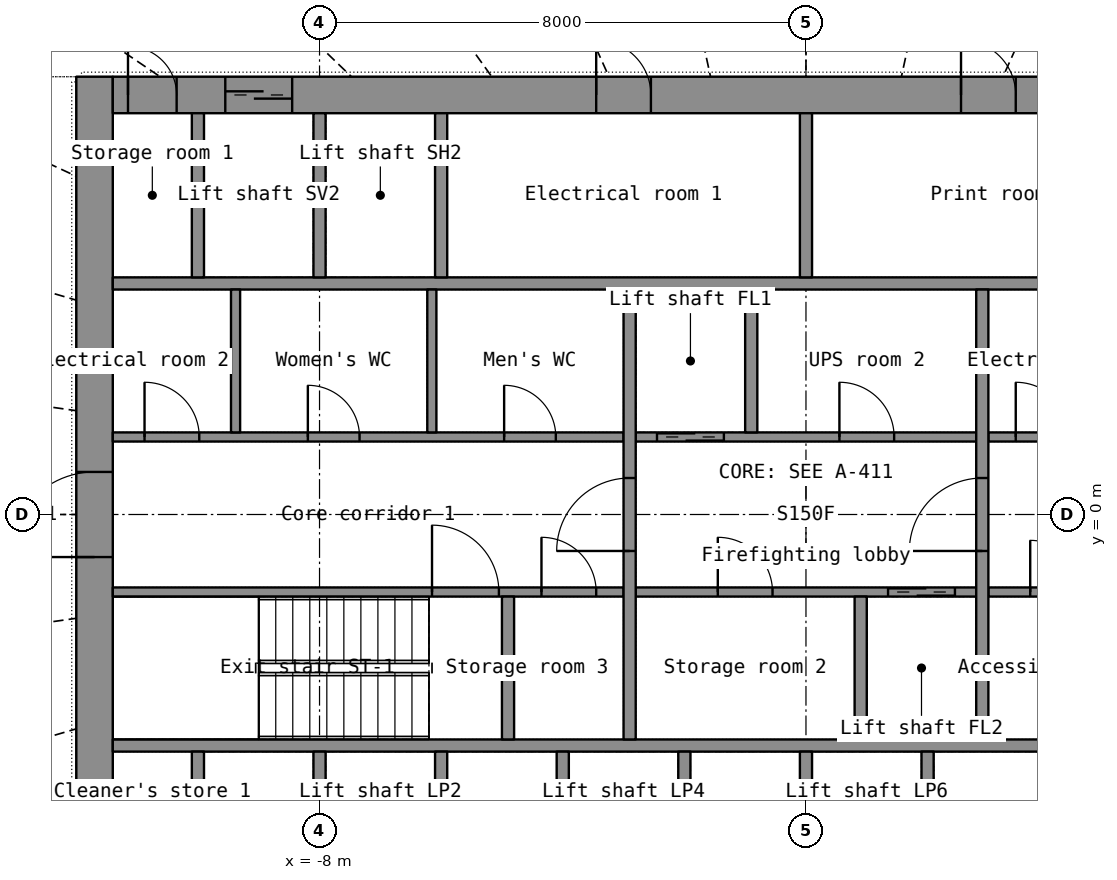
"""IFC4 building model, lengths in metres.
Left out: names, types, materials, properties, quantities, classifications, styles, units other than length and angle.
Written with IfcOpenShell. Run it as: python <this file> out.ifc"""

import sys

from ifc_helpers import new_model, si_unit, direction, frame, frame_2d, origin, place, context, subcontext, project, spatial, rectangle, extrude, element, fill, save


model = new_model("IFC4")
c1 = context("Model", 3, precision=1e-05, world=origin(), true_north=direction((0.0, 1.0)))
c2 = subcontext(c1, "Body", "Model", "MODEL_VIEW")
j1 = project(units=[si_unit("LENGTHUNIT", "METRE"), si_unit("PLANEANGLEUNIT", "RADIAN")], contexts=[c1])
p1 = place(None, origin())
s1 = spatial("IfcSite", under=j1, at=p1, CompositionType="ELEMENT")
p2 = place(p1, origin())
s2 = spatial("IfcBuilding", under=s1, at=p2, CompositionType="ELEMENT")
p3 = place(p2, frame((0.0, 0.0, 77.8)))
s3 = spatial("IfcBuildingStorey", under=s2, at=p3, CompositionType="ELEMENT", Elevation=77.8)
p4 = place(p3, frame((-11.7, -7.2, 0.0), z_axis=(0.0, 0.0, 1.0), x_axis=(0.0, 1.0, 0.0)))
e1 = element("IfcWall", 1, at=p4, inside=s3, PredefinedType="SHEAR", context=c2, shape_type="SweptSolid", body=[
    extrude(rectangle(XDim=14.4, YDim=0.6, at=frame_2d((7.2, 0.0))), origin(), (0.0, 0.0, 1.0), 3.3),
])
p5 = place(p4, frame((6.5, 0.0, 0.0)))
e2 = element("IfcOpeningElement", 2, at=p5, cuts=e1, PredefinedType="OPENING", context=c2, shape_type="SweptSolid", body=[
    extrude(rectangle(XDim=1.4, YDim=2.2, at=frame_2d((0.7, 1.1))), frame((0.0, 0.31, 0.0), z_axis=(0.0, -1.0, 0.0), x_axis=(1.0, 0.0, 0.0)), (0.0, 0.0, 1.0), 0.62),
])
p6 = place(p3, frame((-11.4, 6.9, 0.0), z_axis=(0.0, 0.0, 1.0), x_axis=(1.0, 0.0, 0.0)))
e3 = element("IfcWall", 3, at=p6, inside=s3, PredefinedType="SHEAR", context=c2, shape_type="SweptSolid", body=[
    extrude(rectangle(XDim=22.8, YDim=0.6, at=frame_2d((11.4, 0.0))), origin(), (0.0, 0.0, 1.0), 3.3),
])
p7 = place(p6, frame((1.85, 0.0, 0.0)))
e4 = element("IfcOpeningElement", 4, at=p7, cuts=e3, PredefinedType="OPENING", context=c2, shape_type="SweptSolid", body=[
    extrude(rectangle(XDim=1.1, YDim=2.2, at=frame_2d((0.55, 1.1))), frame((0.0, 0.31, 0.0), z_axis=(0.0, -1.0, 0.0), x_axis=(1.0, 0.0, 0.0)), (0.0, 0.0, 1.0), 0.62),
])
p8 = place(p6, frame((7.95, 0.0, 0.0)))
e5 = element("IfcOpeningElement", 5, at=p8, cuts=e3, PredefinedType="OPENING", context=c2, shape_type="SweptSolid", body=[
    extrude(rectangle(XDim=0.9, YDim=2.1, at=frame_2d((0.45, 1.05))), frame((0.0, 0.31, 0.0), z_axis=(0.0, -1.0, 0.0), x_axis=(1.0, 0.0, 0.0)), (0.0, 0.0, 1.0), 0.62),
])
p9 = place(p6, frame((13.95, 0.0, 0.0)))
e6 = element("IfcOpeningElement", 6, at=p9, cuts=e3, PredefinedType="OPENING", context=c2, shape_type="SweptSolid", body=[
    extrude(rectangle(XDim=0.9, YDim=2.1, at=frame_2d((0.45, 1.05))), frame((0.0, 0.31, 0.0), z_axis=(0.0, -1.0, 0.0), x_axis=(1.0, 0.0, 0.0)), (0.0, 0.0, 1.0), 0.62),
])
p10 = place(p6, frame((18.95, 0.0, 0.0)))
e7 = element("IfcOpeningElement", 7, at=p10, cuts=e3, PredefinedType="OPENING", context=c2, shape_type="SweptSolid", body=[
    extrude(rectangle(XDim=0.9, YDim=2.1, at=frame_2d((0.45, 1.05))), frame((0.0, 0.31, 0.0), z_axis=(0.0, -1.0, 0.0), x_axis=(1.0, 0.0, 0.0)), (0.0, 0.0, 1.0), 0.62),
])
p11 = place(p6, frame((0.25, 0.0, 0.0)))
e8 = element("IfcOpeningElement", 8, at=p11, cuts=e3, PredefinedType="OPENING", context=c2, shape_type="SweptSolid", body=[
    extrude(rectangle(XDim=0.8, YDim=2.05, at=frame_2d((0.4, 1.025))), frame((0.0, 0.31, 0.0), z_axis=(0.0, -1.0, 0.0), x_axis=(1.0, 0.0, 0.0)), (0.0, 0.0, 1.0), 0.62),
])
p12 = place(p6, frame((21.75, 0.0, 0.0)))
e9 = element("IfcOpeningElement", 9, at=p12, cuts=e3, PredefinedType="OPENING", context=c2, shape_type="SweptSolid", body=[
    extrude(rectangle(XDim=0.8, YDim=2.05, at=frame_2d((0.4, 1.025))), frame((0.0, 0.31, 0.0), z_axis=(0.0, -1.0, 0.0), x_axis=(1.0, 0.0, 0.0)), (0.0, 0.0, 1.0), 0.62),
])
for number, where, z_axis, x_axis in (
    (10, (-11.4, -3.8, 0.0), (0.0, 0.0, 1.0), (1.0, 0.0, 0.0)),
    (11, (-11.4, 3.8, 0.0), (0.0, 0.0, 1.0), (1.0, 0.0, 0.0)),
):
    element("IfcWall", number, at=place(p3, frame(where, z_axis=z_axis, x_axis=x_axis)), inside=s3, PredefinedType="SHEAR", context=c2, shape_type="SweptSolid", body=[
        extrude(rectangle(XDim=22.8, YDim=0.2, at=frame_2d((11.4, 0.0))), origin(), (0.0, 0.0, 1.0), 3.3),
    ])
for number, where, z_axis, x_axis in (
    (12, (-10.0, -6.6, 0.0), (0.0, 0.0, 1.0), (0.0, 1.0, 0.0)),
    (13, (-8.0, -6.6, 0.0), (0.0, 0.0, 1.0), (0.0, 1.0, 0.0)),
    (14, (-6.0, -6.6, 0.0), (0.0, 0.0, 1.0), (0.0, 1.0, 0.0)),
    (15, (-4.0, -6.6, 0.0), (0.0, 0.0, 1.0), (0.0, 1.0, 0.0)),
    (16, (-2.0, -6.6, 0.0), (0.0, 0.0, 1.0), (0.0, 1.0, 0.0)),
    (17, (0.0, -6.6, 0.0), (0.0, 0.0, 1.0), (0.0, 1.0, 0.0)),
    (18, (2.0, -6.6, 0.0), (0.0, 0.0, 1.0), (0.0, 1.0, 0.0)),
    (19, (-10.0, 3.9, 0.0), (0.0, 0.0, 1.0), (0.0, 1.0, 0.0)),
    (20, (-8.0, 3.9, 0.0), (0.0, 0.0, 1.0), (0.0, 1.0, 0.0)),
    (21, (-6.0, 3.9, 0.0), (0.0, 0.0, 1.0), (0.0, 1.0, 0.0)),
):
    element("IfcWall", number, at=place(p3, frame(where, z_axis=z_axis, x_axis=x_axis)), inside=s3, PredefinedType="SHEAR", context=c2, shape_type="SweptSolid", body=[
        extrude(rectangle(XDim=2.7, YDim=0.2, at=frame_2d((1.35, 0.0))), origin(), (0.0, 0.0, 1.0), 3.3),
    ])
p13 = place(p3, frame((0.0, 3.9, 0.0), z_axis=(0.0, 0.0, 1.0), x_axis=(0.0, 1.0, 0.0)))
e22 = element("IfcWall", 22, at=p13, inside=s3, PredefinedType="PARTITIONING", context=c2, shape_type="SweptSolid", body=[
    extrude(rectangle(XDim=2.7, YDim=0.2, at=frame_2d((1.35, 0.0))), origin(), (0.0, 0.0, 1.0), 3.3),
])
p14 = place(p3, frame((-11.4, -1.275, 0.0), z_axis=(0.0, 0.0, 1.0), x_axis=(1.0, 0.0, 0.0)))
e23 = element("IfcWall", 23, at=p14, inside=s3, PredefinedType="SHEAR", context=c2, shape_type="SweptSolid", body=[
    extrude(rectangle(XDim=8.4, YDim=0.15, at=frame_2d((4.2, 0.0))), origin(), (0.0, 0.0, 1.0), 3.3),
])
p15 = place(p14, frame((5.25, 0.0, 0.0)))
e24 = element("IfcOpeningElement", 24, at=p15, cuts=e23, PredefinedType="OPENING", context=c2, shape_type="SweptSolid", body=[
    extrude(rectangle(XDim=1.1, YDim=2.15, at=frame_2d((0.55, 1.075))), frame((0.0, 0.085, 0.0), z_axis=(0.0, -1.0, 0.0), x_axis=(1.0, 0.0, 0.0)), (0.0, 0.0, 1.0), 0.17),
])
p16 = place(p14, frame((7.05, 0.0, 0.0)))
e25 = element("IfcOpeningElement", 25, at=p16, cuts=e23, PredefinedType="OPENING", context=c2, shape_type="SweptSolid", body=[
    extrude(rectangle(XDim=0.9, YDim=2.1, at=frame_2d((0.45, 1.05))), frame((0.0, 0.085, 0.0), z_axis=(0.0, -1.0, 0.0), x_axis=(1.0, 0.0, 0.0)), (0.0, 0.0, 1.0), 0.17),
])
p17 = place(p3, frame((-2.8, -1.275, 0.0), z_axis=(0.0, 0.0, 1.0), x_axis=(1.0, 0.0, 0.0)))
e26 = element("IfcWall", 26, at=p17, inside=s3, PredefinedType="SHEAR", context=c2, shape_type="SweptSolid", body=[
    extrude(rectangle(XDim=5.6, YDim=0.15, at=frame_2d((2.8, 0.0))), origin(), (0.0, 0.0, 1.0), 3.3),
])
p18 = place(p17, frame((4.15, 0.0, 0.0)))
e27 = element("IfcOpeningElement", 27, at=p18, cuts=e26, PredefinedType="OPENING", context=c2, shape_type="SweptSolid", body=[
    extrude(rectangle(XDim=1.1, YDim=2.2, at=frame_2d((0.55, 1.1))), frame((0.0, 0.085, 0.0), z_axis=(0.0, -1.0, 0.0), x_axis=(1.0, 0.0, 0.0)), (0.0, 0.0, 1.0), 0.17),
])
p19 = place(p17, frame((1.35, 0.0, 0.0)))
e28 = element("IfcOpeningElement", 28, at=p19, cuts=e26, PredefinedType="OPENING", context=c2, shape_type="SweptSolid", body=[
    extrude(rectangle(XDim=0.9, YDim=2.1, at=frame_2d((0.45, 1.05))), frame((0.0, 0.085, 0.0), z_axis=(0.0, -1.0, 0.0), x_axis=(1.0, 0.0, 0.0)), (0.0, 0.0, 1.0), 0.17),
])
p20 = place(p3, frame((3.0, -1.275, 0.0), z_axis=(0.0, 0.0, 1.0), x_axis=(1.0, 0.0, 0.0)))
e29 = element("IfcWall", 29, at=p20, inside=s3, PredefinedType="PARTITIONING", context=c2, shape_type="SweptSolid", body=[
    extrude(rectangle(XDim=8.4, YDim=0.15, at=frame_2d((4.2, 0.0))), origin(), (0.0, 0.0, 1.0), 3.3),
])
p21 = place(p20, frame((0.688, 0.0, 0.0)))
e30 = element("IfcOpeningElement", 30, at=p21, cuts=e29, PredefinedType="OPENING", context=c2, shape_type="SweptSolid", body=[
    extrude(rectangle(XDim=0.85, YDim=2.1, at=frame_2d((0.425, 1.05))), frame((0.0, 0.085, 0.0), z_axis=(0.0, -1.0, 0.0), x_axis=(1.0, 0.0, 0.0)), (0.0, 0.0, 1.0), 0.17),
])
p22 = place(p20, frame((3.144, 0.0, 0.0)))
e31 = element("IfcOpeningElement", 31, at=p22, cuts=e29, PredefinedType="OPENING", context=c2, shape_type="SweptSolid", body=[
    extrude(rectangle(XDim=0.85, YDim=2.1, at=frame_2d((0.425, 1.05))), frame((0.0, 0.085, 0.0), z_axis=(0.0, -1.0, 0.0), x_axis=(1.0, 0.0, 0.0)), (0.0, 0.0, 1.0), 0.17),
])
p23 = place(p20, frame((5.256, 0.0, 0.0)))
e32 = element("IfcOpeningElement", 32, at=p23, cuts=e29, PredefinedType="OPENING", context=c2, shape_type="SweptSolid", body=[
    extrude(rectangle(XDim=0.9, YDim=2.1, at=frame_2d((0.45, 1.05))), frame((0.0, 0.085, 0.0), z_axis=(0.0, -1.0, 0.0), x_axis=(1.0, 0.0, 0.0)), (0.0, 0.0, 1.0), 0.17),
])
p24 = place(p20, frame((7.075, 0.0, 0.0)))
e33 = element("IfcOpeningElement", 33, at=p24, cuts=e29, PredefinedType="OPENING", context=c2, shape_type="SweptSolid", body=[
    extrude(rectangle(XDim=0.9, YDim=2.1, at=frame_2d((0.45, 1.05))), frame((0.0, 0.085, 0.0), z_axis=(0.0, -1.0, 0.0), x_axis=(1.0, 0.0, 0.0)), (0.0, 0.0, 1.0), 0.17),
])
p25 = place(p3, frame((-11.4, 1.275, 0.0), z_axis=(0.0, 0.0, 1.0), x_axis=(1.0, 0.0, 0.0)))
e34 = element("IfcWall", 34, at=p25, inside=s3, PredefinedType="PARTITIONING", context=c2, shape_type="SweptSolid", body=[
    extrude(rectangle(XDim=8.4, YDim=0.15, at=frame_2d((4.2, 0.0))), origin(), (0.0, 0.0, 1.0), 3.3),
])
p26 = place(p25, frame((0.522, 0.0, 0.0)))
e35 = element("IfcOpeningElement", 35, at=p26, cuts=e34, PredefinedType="OPENING", context=c2, shape_type="SweptSolid", body=[
    extrude(rectangle(XDim=0.9, YDim=2.1, at=frame_2d((0.45, 1.05))), frame((0.0, 0.085, 0.0), z_axis=(0.0, -1.0, 0.0), x_axis=(1.0, 0.0, 0.0)), (0.0, 0.0, 1.0), 0.17),
])
p27 = place(p25, frame((3.208, 0.0, 0.0)))
e36 = element("IfcOpeningElement", 36, at=p27, cuts=e34, PredefinedType="OPENING", context=c2, shape_type="SweptSolid", body=[
    extrude(rectangle(XDim=0.85, YDim=2.1, at=frame_2d((0.425, 1.05))), frame((0.0, 0.085, 0.0), z_axis=(0.0, -1.0, 0.0), x_axis=(1.0, 0.0, 0.0)), (0.0, 0.0, 1.0), 0.17),
])
p28 = place(p25, frame((6.436, 0.0, 0.0)))
e37 = element("IfcOpeningElement", 37, at=p28, cuts=e34, PredefinedType="OPENING", context=c2, shape_type="SweptSolid", body=[
    extrude(rectangle(XDim=0.85, YDim=2.1, at=frame_2d((0.425, 1.05))), frame((0.0, 0.085, 0.0), z_axis=(0.0, -1.0, 0.0), x_axis=(1.0, 0.0, 0.0)), (0.0, 0.0, 1.0), 0.17),
])
p29 = place(p3, frame((-2.8, 1.275, 0.0), z_axis=(0.0, 0.0, 1.0), x_axis=(1.0, 0.0, 0.0)))
e38 = element("IfcWall", 38, at=p29, inside=s3, PredefinedType="SHEAR", context=c2, shape_type="SweptSolid", body=[
    extrude(rectangle(XDim=5.6, YDim=0.15, at=frame_2d((2.8, 0.0))), origin(), (0.0, 0.0, 1.0), 3.3),
])
p30 = place(p29, frame((0.35, 0.0, 0.0)))
e39 = element("IfcOpeningElement", 39, at=p30, cuts=e38, PredefinedType="OPENING", context=c2, shape_type="SweptSolid", body=[
    extrude(rectangle(XDim=1.1, YDim=2.2, at=frame_2d((0.55, 1.1))), frame((0.0, 0.085, 0.0), z_axis=(0.0, -1.0, 0.0), x_axis=(1.0, 0.0, 0.0)), (0.0, 0.0, 1.0), 0.17),
])
p31 = place(p29, frame((3.35, 0.0, 0.0)))
e40 = element("IfcOpeningElement", 40, at=p31, cuts=e38, PredefinedType="OPENING", context=c2, shape_type="SweptSolid", body=[
    extrude(rectangle(XDim=0.9, YDim=2.1, at=frame_2d((0.45, 1.05))), frame((0.0, 0.085, 0.0), z_axis=(0.0, -1.0, 0.0), x_axis=(1.0, 0.0, 0.0)), (0.0, 0.0, 1.0), 0.17),
])
p32 = place(p3, frame((3.0, 1.275, 0.0), z_axis=(0.0, 0.0, 1.0), x_axis=(1.0, 0.0, 0.0)))
e41 = element("IfcWall", 41, at=p32, inside=s3, PredefinedType="SHEAR", context=c2, shape_type="SweptSolid", body=[
    extrude(rectangle(XDim=8.4, YDim=0.15, at=frame_2d((4.2, 0.0))), origin(), (0.0, 0.0, 1.0), 3.3),
])
p33 = place(p32, frame((2.05, 0.0, 0.0)))
e42 = element("IfcOpeningElement", 42, at=p33, cuts=e41, PredefinedType="OPENING", context=c2, shape_type="SweptSolid", body=[
    extrude(rectangle(XDim=1.1, YDim=2.15, at=frame_2d((0.55, 1.075))), frame((0.0, 0.085, 0.0), z_axis=(0.0, -1.0, 0.0), x_axis=(1.0, 0.0, 0.0)), (0.0, 0.0, 1.0), 0.17),
])
p34 = place(p32, frame((0.45, 0.0, 0.0)))
e43 = element("IfcOpeningElement", 43, at=p34, cuts=e41, PredefinedType="OPENING", context=c2, shape_type="SweptSolid", body=[
    extrude(rectangle(XDim=0.9, YDim=2.1, at=frame_2d((0.45, 1.05))), frame((0.0, 0.085, 0.0), z_axis=(0.0, -1.0, 0.0), x_axis=(1.0, 0.0, 0.0)), (0.0, 0.0, 1.0), 0.17),
])
p35 = place(p3, frame((-2.9, -3.7, 0.0), z_axis=(0.0, 0.0, 1.0), x_axis=(0.0, 1.0, 0.0)))
e44 = element("IfcWall", 44, at=p35, inside=s3, PredefinedType="SHEAR", context=c2, shape_type="SweptSolid", body=[
    extrude(rectangle(XDim=7.4, YDim=0.2, at=frame_2d((3.7, 0.0))), origin(), (0.0, 0.0, 1.0), 3.3),
])
p36 = place(p35, frame((3.1, 0.0, 0.0)))
e45 = element("IfcOpeningElement", 45, at=p36, cuts=e44, PredefinedType="OPENING", context=c2, shape_type="SweptSolid", body=[
    extrude(rectangle(XDim=1.2, YDim=2.2, at=frame_2d((0.6, 1.1))), frame((0.0, 0.11, 0.0), z_axis=(0.0, -1.0, 0.0), x_axis=(1.0, 0.0, 0.0)), (0.0, 0.0, 1.0), 0.22),
])
p37 = place(p3, frame((2.9, -3.7, 0.0), z_axis=(0.0, 0.0, 1.0), x_axis=(0.0, 1.0, 0.0)))
e46 = element("IfcWall", 46, at=p37, inside=s3, PredefinedType="SHEAR", context=c2, shape_type="SweptSolid", body=[
    extrude(rectangle(XDim=7.4, YDim=0.2, at=frame_2d((3.7, 0.0))), origin(), (0.0, 0.0, 1.0), 3.3),
])
p38 = place(p37, frame((3.1, 0.0, 0.0)))
e47 = element("IfcOpeningElement", 47, at=p38, cuts=e46, PredefinedType="OPENING", context=c2, shape_type="SweptSolid", body=[
    extrude(rectangle(XDim=1.2, YDim=2.2, at=frame_2d((0.6, 1.1))), frame((0.0, 0.11, 0.0), z_axis=(0.0, -1.0, 0.0), x_axis=(1.0, 0.0, 0.0)), (0.0, 0.0, 1.0), 0.22),
])
for number, where, z_axis, x_axis in (
    (48, (-0.9, 1.35, 0.0), (0.0, 0.0, 1.0), (0.0, 1.0, 0.0)),
    (49, (0.9, -3.7, 0.0), (0.0, 0.0, 1.0), (0.0, 1.0, 0.0)),
    (50, (-4.9, -3.7, 0.0), (0.0, 0.0, 1.0), (0.0, 1.0, 0.0)),
):
    element("IfcWall", number, at=place(p3, frame(where, z_axis=z_axis, x_axis=x_axis)), inside=s3, PredefinedType="SHEAR", context=c2, shape_type="SweptSolid", body=[
        extrude(rectangle(XDim=2.35, YDim=0.2, at=frame_2d((1.175, 0.0))), origin(), (0.0, 0.0, 1.0), 3.3),
    ])
for number, where, z_axis, x_axis in (
    (51, (-9.381, 1.35, 0.0), (0.0, 0.0, 1.0), (0.0, 1.0, 0.0)),
    (52, (-6.153, 1.35, 0.0), (0.0, 0.0, 1.0), (0.0, 1.0, 0.0)),
):
    element("IfcWall", number, at=place(p3, frame(where, z_axis=z_axis, x_axis=x_axis)), inside=s3, PredefinedType="PARTITIONING", context=c2, shape_type="SweptSolid", body=[
        extrude(rectangle(XDim=2.35, YDim=0.15, at=frame_2d((1.175, 0.0))), origin(), (0.0, 0.0, 1.0), 3.3),
    ])
p39 = place(p7, origin())
e53 = element("IfcDoor", 53, at=p39, inside=s3, OperationType="DOUBLE_DOOR_SLIDING", PredefinedType="DOOR", context=c2, shape_type="SweptSolid", body=[
    extrude(rectangle(XDim=1.1, YDim=2.2, at=frame_2d((0.55, 1.1))), frame((0.0, 0.025, 0.0), z_axis=(0.0, -1.0, 0.0), x_axis=(1.0, 0.0, 0.0)), (0.0, 0.0, 1.0), 0.05),
])
fill(e4, e53)
p40 = place(p8, origin())
e54 = element("IfcDoor", 54, at=p40, inside=s3, OperationType="SINGLE_SWING_LEFT", PredefinedType="DOOR", context=c2, shape_type="SweptSolid", body=[
    extrude(rectangle(XDim=0.9, YDim=2.1, at=frame_2d((0.45, 1.05))), frame((0.0, 0.025, 0.0), z_axis=(0.0, -1.0, 0.0), x_axis=(1.0, 0.0, 0.0)), (0.0, 0.0, 1.0), 0.05),
])
fill(e5, e54)
p41 = place(p9, origin())
e55 = element("IfcDoor", 55, at=p41, inside=s3, OperationType="SINGLE_SWING_LEFT", PredefinedType="DOOR", context=c2, shape_type="SweptSolid", body=[
    extrude(rectangle(XDim=0.9, YDim=2.1, at=frame_2d((0.45, 1.05))), frame((0.0, 0.025, 0.0), z_axis=(0.0, -1.0, 0.0), x_axis=(1.0, 0.0, 0.0)), (0.0, 0.0, 1.0), 0.05),
])
fill(e6, e55)
p42 = place(p11, origin())
e56 = element("IfcDoor", 56, at=p42, inside=s3, OperationType="SINGLE_SWING_LEFT", PredefinedType="DOOR", context=c2, shape_type="SweptSolid", body=[
    extrude(rectangle(XDim=0.8, YDim=2.05, at=frame_2d((0.4, 1.025))), frame((0.0, 0.025, 0.0), z_axis=(0.0, -1.0, 0.0), x_axis=(1.0, 0.0, 0.0)), (0.0, 0.0, 1.0), 0.05),
])
fill(e8, e56)
p43 = place(p5, origin())
e57 = element("IfcDoor", 57, at=p43, inside=s3, OperationType="DOUBLE_DOOR_SINGLE_SWING", PredefinedType="DOOR", context=c2, shape_type="SweptSolid", body=[
    extrude(rectangle(XDim=1.4, YDim=2.2, at=frame_2d((0.7, 1.1))), frame((0.0, 0.025, 0.0), z_axis=(0.0, -1.0, 0.0), x_axis=(1.0, 0.0, 0.0)), (0.0, 0.0, 1.0), 0.05),
])
fill(e2, e57)
p44 = place(p36, origin())
e58 = element("IfcDoor", 58, at=p44, inside=s3, OperationType="SINGLE_SWING_LEFT", PredefinedType="DOOR", context=c2, shape_type="SweptSolid", body=[
    extrude(rectangle(XDim=1.2, YDim=2.2, at=frame_2d((0.6, 1.1))), frame((0.0, 0.025, 0.0), z_axis=(0.0, -1.0, 0.0), x_axis=(1.0, 0.0, 0.0)), (0.0, 0.0, 1.0), 0.05),
])
fill(e45, e58)
p45 = place(p38, origin())
e59 = element("IfcDoor", 59, at=p45, inside=s3, OperationType="SINGLE_SWING_LEFT", PredefinedType="DOOR", context=c2, shape_type="SweptSolid", body=[
    extrude(rectangle(XDim=1.2, YDim=2.2, at=frame_2d((0.6, 1.1))), frame((0.0, 0.025, 0.0), z_axis=(0.0, -1.0, 0.0), x_axis=(1.0, 0.0, 0.0)), (0.0, 0.0, 1.0), 0.05),
])
fill(e47, e59)
p46 = place(p30, origin())
e60 = element("IfcDoor", 60, at=p46, inside=s3, OperationType="DOUBLE_DOOR_SLIDING", PredefinedType="DOOR", context=c2, shape_type="SweptSolid", body=[
    extrude(rectangle(XDim=1.1, YDim=2.2, at=frame_2d((0.55, 1.1))), frame((0.0, 0.025, 0.0), z_axis=(0.0, -1.0, 0.0), x_axis=(1.0, 0.0, 0.0)), (0.0, 0.0, 1.0), 0.05),
])
fill(e39, e60)
p47 = place(p18, origin())
e61 = element("IfcDoor", 61, at=p47, inside=s3, OperationType="DOUBLE_DOOR_SLIDING", PredefinedType="DOOR", context=c2, shape_type="SweptSolid", body=[
    extrude(rectangle(XDim=1.1, YDim=2.2, at=frame_2d((0.55, 1.1))), frame((0.0, 0.025, 0.0), z_axis=(0.0, -1.0, 0.0), x_axis=(1.0, 0.0, 0.0)), (0.0, 0.0, 1.0), 0.05),
])
fill(e27, e61)
p48 = place(p15, origin())
e62 = element("IfcDoor", 62, at=p48, inside=s3, OperationType="SINGLE_SWING_LEFT", PredefinedType="DOOR", context=c2, shape_type="SweptSolid", body=[
    extrude(rectangle(XDim=1.1, YDim=2.15, at=frame_2d((0.55, 1.075))), frame((0.0, 0.025, 0.0), z_axis=(0.0, -1.0, 0.0), x_axis=(1.0, 0.0, 0.0)), (0.0, 0.0, 1.0), 0.05),
])
fill(e24, e62)
p49 = place(p26, origin())
e63 = element("IfcDoor", 63, at=p49, inside=s3, OperationType="SINGLE_SWING_LEFT", PredefinedType="DOOR", context=c2, shape_type="SweptSolid", body=[
    extrude(rectangle(XDim=0.9, YDim=2.1, at=frame_2d((0.45, 1.05))), frame((0.0, 0.025, 0.0), z_axis=(0.0, -1.0, 0.0), x_axis=(1.0, 0.0, 0.0)), (0.0, 0.0, 1.0), 0.05),
])
fill(e35, e63)
p50 = place(p27, origin())
e64 = element("IfcDoor", 64, at=p50, inside=s3, OperationType="SINGLE_SWING_LEFT", PredefinedType="DOOR", context=c2, shape_type="SweptSolid", body=[
    extrude(rectangle(XDim=0.85, YDim=2.1, at=frame_2d((0.425, 1.05))), frame((0.0, 0.025, 0.0), z_axis=(0.0, -1.0, 0.0), x_axis=(1.0, 0.0, 0.0)), (0.0, 0.0, 1.0), 0.05),
])
fill(e36, e64)
p51 = place(p28, origin())
e65 = element("IfcDoor", 65, at=p51, inside=s3, OperationType="SINGLE_SWING_LEFT", PredefinedType="DOOR", context=c2, shape_type="SweptSolid", body=[
    extrude(rectangle(XDim=0.85, YDim=2.1, at=frame_2d((0.425, 1.05))), frame((0.0, 0.025, 0.0), z_axis=(0.0, -1.0, 0.0), x_axis=(1.0, 0.0, 0.0)), (0.0, 0.0, 1.0), 0.05),
])
fill(e37, e65)
p52 = place(p21, origin())
e66 = element("IfcDoor", 66, at=p52, inside=s3, OperationType="SINGLE_SWING_LEFT", PredefinedType="DOOR", context=c2, shape_type="SweptSolid", body=[
    extrude(rectangle(XDim=0.85, YDim=2.1, at=frame_2d((0.425, 1.05))), frame((0.0, 0.025, 0.0), z_axis=(0.0, -1.0, 0.0), x_axis=(1.0, 0.0, 0.0)), (0.0, 0.0, 1.0), 0.05),
])
fill(e30, e66)
p53 = place(p31, origin())
e67 = element("IfcDoor", 67, at=p53, inside=s3, OperationType="SINGLE_SWING_LEFT", PredefinedType="DOOR", context=c2, shape_type="SweptSolid", body=[
    extrude(rectangle(XDim=0.9, YDim=2.1, at=frame_2d((0.45, 1.05))), frame((0.0, 0.025, 0.0), z_axis=(0.0, -1.0, 0.0), x_axis=(1.0, 0.0, 0.0)), (0.0, 0.0, 1.0), 0.05),
])
fill(e40, e67)
p54 = place(p19, origin())
e68 = element("IfcDoor", 68, at=p54, inside=s3, OperationType="SINGLE_SWING_LEFT", PredefinedType="DOOR", context=c2, shape_type="SweptSolid", body=[
    extrude(rectangle(XDim=0.9, YDim=2.1, at=frame_2d((0.45, 1.05))), frame((0.0, 0.025, 0.0), z_axis=(0.0, -1.0, 0.0), x_axis=(1.0, 0.0, 0.0)), (0.0, 0.0, 1.0), 0.05),
])
fill(e28, e68)
p55 = place(p34, origin())
e69 = element("IfcDoor", 69, at=p55, inside=s3, OperationType="SINGLE_SWING_LEFT", PredefinedType="DOOR", context=c2, shape_type="SweptSolid", body=[
    extrude(rectangle(XDim=0.9, YDim=2.1, at=frame_2d((0.45, 1.05))), frame((0.0, 0.025, 0.0), z_axis=(0.0, -1.0, 0.0), x_axis=(1.0, 0.0, 0.0)), (0.0, 0.0, 1.0), 0.05),
])
fill(e43, e69)
p56 = place(p16, origin())
e70 = element("IfcDoor", 70, at=p56, inside=s3, OperationType="SINGLE_SWING_LEFT", PredefinedType="DOOR", context=c2, shape_type="SweptSolid", body=[
    extrude(rectangle(XDim=0.9, YDim=2.1, at=frame_2d((0.45, 1.05))), frame((0.0, 0.025, 0.0), z_axis=(0.0, -1.0, 0.0), x_axis=(1.0, 0.0, 0.0)), (0.0, 0.0, 1.0), 0.05),
])
fill(e25, e70)
save(model, sys.argv[1])
